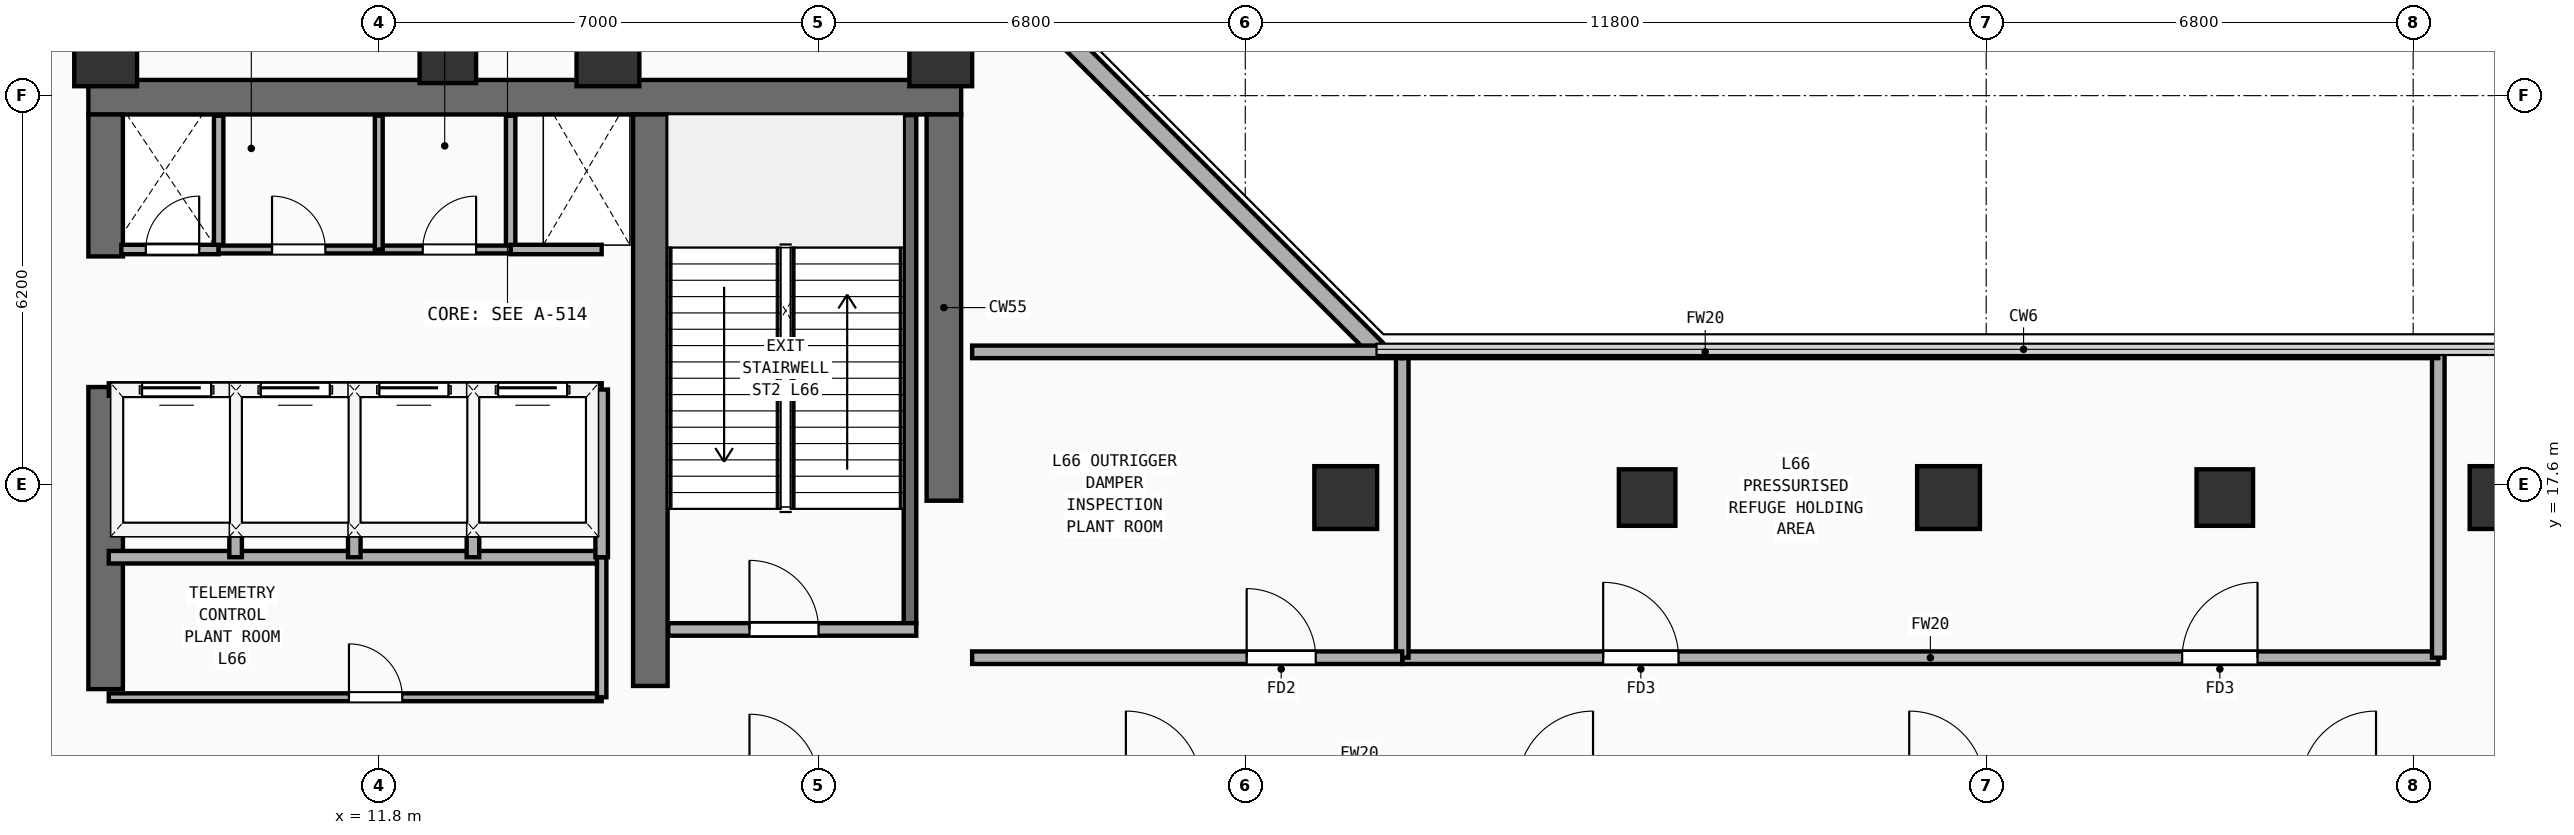
"""IFC4 building model, lengths in metres.
Left out: names, types, materials, properties, quantities, classifications, styles, units other than length and angle.
Written with IfcOpenShell. Run it as: python <this file> out.ifc"""

import sys

from ifc_helpers import new_model, si_unit, direction, frame, frame_2d, origin, origin_2d, place, context, subcontext, project, spatial, rectangle, extrude, element, fill, save


model = new_model("IFC4")
c1 = context("Model", 3, precision=1e-05, world=origin(), true_north=direction((0.0, 1.0)))
c2 = subcontext(c1, "Body", "Model", "MODEL_VIEW")
j1 = project(units=[si_unit("LENGTHUNIT", "METRE"), si_unit("PLANEANGLEUNIT", "RADIAN")], contexts=[c1])
p1 = place(None, origin())
s1 = spatial("IfcSite", under=j1, at=p1, CompositionType="ELEMENT")
p2 = place(p1, origin())
s2 = spatial("IfcBuilding", under=s1, at=p2, CompositionType="ELEMENT")
p3 = place(p2, frame((0.0, 0.0, 257.7)))
s3 = spatial("IfcBuildingStorey", under=s2, at=p3, CompositionType="ELEMENT", Elevation=257.7)
p4 = place(p3, frame((7.175, 23.775, 0.0), z_axis=(0.0, 0.0, 1.0), x_axis=(1.0, 0.0, 0.0)))
e1 = element("IfcWall", 1, at=p4, inside=s3, PredefinedType="SHEAR", context=c2, shape_type="SweptSolid", body=[
    extrude(rectangle(XDim=13.9, YDim=0.55, at=frame_2d((6.95, 0.0))), origin(), (0.0, 0.0, 1.0), 4.86),
])
p5 = place(p3, frame((7.45, 14.35, 0.0), z_axis=(0.0, 0.0, 1.0), x_axis=(0.0, 1.0, 0.0)))
e2 = element("IfcWall", 2, at=p5, inside=s3, PredefinedType="SHEAR", context=c2, shape_type="SweptSolid", body=[
    extrude(rectangle(XDim=4.81, YDim=0.55, at=frame_2d((2.405, 0.0))), origin(), (0.0, 0.0, 1.0), 4.86),
])
p6 = place(p3, frame((7.45, 21.24, 0.0), z_axis=(0.0, 0.0, 1.0), x_axis=(0.0, 1.0, 0.0)))
e3 = element("IfcWall", 3, at=p6, inside=s3, PredefinedType="SHEAR", context=c2, shape_type="SweptSolid", body=[
    extrude(rectangle(XDim=2.26, YDim=0.55, at=frame_2d((1.13, 0.0))), origin(), (0.0, 0.0, 1.0), 4.86),
])
p7 = place(p3, frame((20.8, 17.35, 0.0), z_axis=(0.0, 0.0, 1.0), x_axis=(0.0, 1.0, 0.0)))
e4 = element("IfcWall", 4, at=p7, inside=s3, PredefinedType="SHEAR", context=c2, shape_type="SweptSolid", body=[
    extrude(rectangle(XDim=6.15, YDim=0.55, at=frame_2d((3.075, 0.0))), origin(), (0.0, 0.0, 1.0), 4.86),
])
p8 = place(p3, frame((16.125, 14.4, 0.0), z_axis=(0.0, 0.0, 1.0), x_axis=(0.0, 1.0, 0.0)))
e5 = element("IfcWall", 5, at=p8, inside=s3, PredefinedType="SHEAR", context=c2, shape_type="SweptSolid", body=[
    extrude(rectangle(XDim=9.1, YDim=0.55, at=frame_2d((4.55, 0.0))), origin(), (0.0, 0.0, 1.0), 4.86),
])
for number, where, z_axis, x_axis in (
    (6, (7.45, 24.45, 0.0), (0.0, 0.0, 1.0), (1.0, 0.0, 0.0)),
    (7, (15.45, 24.45, 0.0), (0.0, 0.0, 1.0), (1.0, 0.0, 0.0)),
    (8, (20.75, 24.45, 0.0), (0.0, 0.0, 1.0), (1.0, 0.0, 0.0)),
    (9, (27.2, 17.4, 0.0), (0.0, 0.0, 1.0), (1.0, 0.0, 0.0)),
    (10, (36.8, 17.4, 0.0), (0.0, 0.0, 1.0), (1.0, 0.0, 0.0)),
    (11, (45.6, 17.4, 0.0), (0.0, 0.0, 1.0), (1.0, 0.0, 0.0)),
):
    element("IfcColumn", number, at=place(p3, frame(where, z_axis=z_axis, x_axis=x_axis)), inside=s3, PredefinedType="COLUMN", context=c2, shape_type="SweptSolid", body=[
        extrude(rectangle(XDim=1.0, YDim=1.0, at=origin_2d()), origin(), (0.0, 0.0, 1.0), 4.86),
    ])
for number, where, z_axis, x_axis in (
    (12, (12.9, 24.45, 0.0), (0.0, 0.0, 1.0), (1.0, 0.0, 0.0)),
    (13, (32.0, 17.4, 0.0), (0.0, 0.0, 1.0), (1.0, 0.0, 0.0)),
    (14, (41.2, 17.4, 0.0), (0.0, 0.0, 1.0), (1.0, 0.0, 0.0)),
):
    element("IfcColumn", number, at=place(p3, frame(where, z_axis=z_axis, x_axis=x_axis)), inside=s3, PredefinedType="COLUMN", context=c2, shape_type="SweptSolid", body=[
        extrude(rectangle(XDim=0.9, YDim=0.9, at=origin_2d()), origin(), (0.0, 0.0, 1.0), 4.86),
    ])
p9 = place(p3, frame((27.685, 19.775, 0.0), z_axis=(0.0, 0.0, 1.0), x_axis=(-0.707106781187, 0.707106781187, 0.0)))
e15 = element("IfcWall", 15, at=p9, inside=s3, PredefinedType="SOLIDWALL", context=c2, shape_type="SweptSolid", body=[
    extrude(rectangle(XDim=9.207, YDim=0.28, at=frame_2d((4.603, 0.0))), origin(), (0.0, 0.0, 1.0), 4.86),
])
p10 = place(p3, frame((20.26, 15.4, 0.0), z_axis=(0.0, 0.0, 1.0), x_axis=(0.0, 1.0, 0.0)))
e16 = element("IfcWall", 16, at=p10, inside=s3, PredefinedType="SHEAR", context=c2, shape_type="SweptSolid", body=[
    extrude(rectangle(XDim=8.09, YDim=0.2, at=frame_2d((4.045, 0.0))), origin(), (0.0, 0.0, 1.0), 4.86),
])
p11 = place(p3, frame((16.41, 15.3, 0.0), z_axis=(0.0, 0.0, 1.0), x_axis=(1.0, 0.0, 0.0)))
e17 = element("IfcWall", 17, at=p11, inside=s3, PredefinedType="PARTITIONING", context=c2, shape_type="SweptSolid", body=[
    extrude(rectangle(XDim=3.95, YDim=0.2, at=frame_2d((1.975, 0.0))), origin(), (0.0, 0.0, 1.0), 4.86),
])
p12 = place(p11, frame((1.294, 0.0, 0.0)))
e18 = element("IfcOpeningElement", 18, at=p12, cuts=e17, PredefinedType="OPENING", context=c2, shape_type="SweptSolid", body=[
    extrude(rectangle(XDim=1.1, YDim=2.2, at=frame_2d((0.55, 1.1))), frame((0.0, 0.11, 0.0), z_axis=(0.0, -1.0, 0.0), x_axis=(1.0, 0.0, 0.0)), (0.0, 0.0, 1.0), 0.22),
])
p13 = place(p3, frame((7.5, 16.45, 0.0), z_axis=(0.0, 0.0, 1.0), x_axis=(1.0, 0.0, 0.0)))
e19 = element("IfcWall", 19, at=p13, inside=s3, PredefinedType="PARTITIONING", context=c2, shape_type="SweptSolid", body=[
    extrude(rectangle(XDim=7.85, YDim=0.2, at=frame_2d((3.925, 0.0))), origin(), (0.0, 0.0, 1.0), 4.86),
])
p14 = place(p3, frame((7.5, 14.22, 0.0), z_axis=(0.0, 0.0, 1.0), x_axis=(1.0, 0.0, 0.0)))
e20 = element("IfcWall", 20, at=p14, inside=s3, PredefinedType="PARTITIONING", context=c2, shape_type="SweptSolid", body=[
    extrude(rectangle(XDim=7.85, YDim=0.125, at=frame_2d((3.925, 0.0))), origin(), (0.0, 0.0, 1.0), 4.86),
])
p15 = place(p14, frame((3.825, 0.0, 0.0)))
e21 = element("IfcOpeningElement", 21, at=p15, cuts=e20, PredefinedType="OPENING", context=c2, shape_type="SweptSolid", body=[
    extrude(rectangle(XDim=0.85, YDim=2.15, at=frame_2d((0.425, 1.075))), frame((0.0, 0.073, 0.0), z_axis=(0.0, -1.0, 0.0), x_axis=(1.0, 0.0, 0.0)), (0.0, 0.0, 1.0), 0.145),
])
p16 = place(p3, frame((15.35, 14.22, 0.0), z_axis=(0.0, 0.0, 1.0), x_axis=(0.0, 1.0, 0.0)))
e22 = element("IfcWall", 22, at=p16, inside=s3, PredefinedType="PARTITIONING", context=c2, shape_type="SweptSolid", body=[
    extrude(rectangle(XDim=2.23, YDim=0.15, at=frame_2d((1.115, 0.0))), origin(), (0.0, 0.0, 1.0), 4.86),
])
p17 = place(p3, frame((7.5, 19.12, 0.0), z_axis=(0.0, 0.0, 1.0), x_axis=(1.0, 0.0, 0.0)))
e23 = element("IfcWall", 23, at=p17, inside=s3, PredefinedType="PARTITIONING", context=c2, shape_type="SweptSolid", body=[
    extrude(rectangle(XDim=7.85, YDim=0.2, at=frame_2d((3.925, 0.0))), origin(), (0.0, 0.0, 1.0), 4.86),
])
p18 = place(p17, frame((0.53, 0.0, 0.0)))
e24 = element("IfcOpeningElement", 24, at=p18, cuts=e23, PredefinedType="OPENING", context=c2, shape_type="SweptSolid", body=[
    extrude(rectangle(XDim=1.1, YDim=2.2, at=frame_2d((0.55, 1.1))), frame((0.0, 0.11, 0.0), z_axis=(0.0, -1.0, 0.0), x_axis=(1.0, 0.0, 0.0)), (0.0, 0.0, 1.0), 0.22),
])
p19 = place(p17, frame((2.42, 0.0, 0.0)))
e25 = element("IfcOpeningElement", 25, at=p19, cuts=e23, PredefinedType="OPENING", context=c2, shape_type="SweptSolid", body=[
    extrude(rectangle(XDim=1.1, YDim=2.2, at=frame_2d((0.55, 1.1))), frame((0.0, 0.11, 0.0), z_axis=(0.0, -1.0, 0.0), x_axis=(1.0, 0.0, 0.0)), (0.0, 0.0, 1.0), 0.22),
])
p20 = place(p17, frame((4.31, 0.0, 0.0)))
e26 = element("IfcOpeningElement", 26, at=p20, cuts=e23, PredefinedType="OPENING", context=c2, shape_type="SweptSolid", body=[
    extrude(rectangle(XDim=1.1, YDim=2.2, at=frame_2d((0.55, 1.1))), frame((0.0, 0.11, 0.0), z_axis=(0.0, -1.0, 0.0), x_axis=(1.0, 0.0, 0.0)), (0.0, 0.0, 1.0), 0.22),
])
p21 = place(p17, frame((6.2, 0.0, 0.0)))
e27 = element("IfcOpeningElement", 27, at=p21, cuts=e23, PredefinedType="OPENING", context=c2, shape_type="SweptSolid", body=[
    extrude(rectangle(XDim=1.1, YDim=2.2, at=frame_2d((0.55, 1.1))), frame((0.0, 0.11, 0.0), z_axis=(0.0, -1.0, 0.0), x_axis=(1.0, 0.0, 0.0)), (0.0, 0.0, 1.0), 0.22),
])
for number, where, z_axis, x_axis in (
    (28, (15.35, 16.45, 0.0), (0.0, 0.0, 1.0), (0.0, 1.0, 0.0)),
    (29, (9.52, 16.45, 0.0), (0.0, 0.0, 1.0), (0.0, 1.0, 0.0)),
    (30, (11.41, 16.45, 0.0), (0.0, 0.0, 1.0), (0.0, 1.0, 0.0)),
    (31, (13.3, 16.45, 0.0), (0.0, 0.0, 1.0), (0.0, 1.0, 0.0)),
):
    element("IfcWall", number, at=place(p3, frame(where, z_axis=z_axis, x_axis=x_axis)), inside=s3, PredefinedType="PARTITIONING", context=c2, shape_type="SweptSolid", body=[
        extrude(rectangle(XDim=2.67, YDim=0.2, at=frame_2d((1.335, 0.0))), origin(), (0.0, 0.0, 1.0), 4.86),
    ])
for number, where, z_axis, x_axis in (
    (32, (9.25, 21.35, 0.0), (0.0, 0.0, 1.0), (0.0, 1.0, 0.0)),
    (33, (13.9, 21.35, 0.0), (0.0, 0.0, 1.0), (0.0, 1.0, 0.0)),
):
    element("IfcWall", number, at=place(p3, frame(where, z_axis=z_axis, x_axis=x_axis)), inside=s3, PredefinedType="PARTITIONING", context=c2, shape_type="SweptSolid", body=[
        extrude(rectangle(XDim=2.13, YDim=0.15, at=frame_2d((1.065, 0.0))), origin(), (0.0, 0.0, 1.0), 4.86),
    ])
p22 = place(p3, frame((7.7, 21.35, 0.0), z_axis=(0.0, 0.0, 1.0), x_axis=(1.0, 0.0, 0.0)))
e34 = element("IfcWall", 34, at=p22, inside=s3, PredefinedType="PARTITIONING", context=c2, shape_type="SweptSolid", body=[
    extrude(rectangle(XDim=1.55, YDim=0.15, at=frame_2d((0.775, 0.0))), origin(), (0.0, 0.0, 1.0), 4.86),
])
p23 = place(p22, frame((0.39, 0.0, 0.0)))
e35 = element("IfcOpeningElement", 35, at=p23, cuts=e34, PredefinedType="OPENING", context=c2, shape_type="SweptSolid", body=[
    extrude(rectangle(XDim=0.85, YDim=2.15, at=frame_2d((0.425, 1.075))), frame((0.0, 0.085, 0.0), z_axis=(0.0, -1.0, 0.0), x_axis=(1.0, 0.0, 0.0)), (0.0, 0.0, 1.0), 0.17),
])
p24 = place(p3, frame((13.9, 21.35, 0.0), z_axis=(0.0, 0.0, 1.0), x_axis=(1.0, 0.0, 0.0)))
e36 = element("IfcWall", 36, at=p24, inside=s3, PredefinedType="PARTITIONING", context=c2, shape_type="SweptSolid", body=[
    extrude(rectangle(XDim=1.45, YDim=0.15, at=frame_2d((0.725, 0.0))), origin(), (0.0, 0.0, 1.0), 4.86),
])
p25 = place(p3, frame((9.25, 21.35, 0.0), z_axis=(0.0, 0.0, 1.0), x_axis=(1.0, 0.0, 0.0)))
e37 = element("IfcWall", 37, at=p25, inside=s3, PredefinedType="PARTITIONING", context=c2, shape_type="SweptSolid", body=[
    extrude(rectangle(XDim=4.65, YDim=0.125, at=frame_2d((2.325, 0.0))), origin(), (0.0, 0.0, 1.0), 4.86),
])
p26 = place(p25, frame((0.85, 0.0, 0.0)))
e38 = element("IfcOpeningElement", 38, at=p26, cuts=e37, PredefinedType="OPENING", context=c2, shape_type="SweptSolid", body=[
    extrude(rectangle(XDim=0.85, YDim=2.15, at=frame_2d((0.425, 1.075))), frame((0.0, 0.073, 0.0), z_axis=(0.0, -1.0, 0.0), x_axis=(1.0, 0.0, 0.0)), (0.0, 0.0, 1.0), 0.145),
])
p27 = place(p25, frame((3.25, 0.0, 0.0)))
e39 = element("IfcOpeningElement", 39, at=p27, cuts=e37, PredefinedType="OPENING", context=c2, shape_type="SweptSolid", body=[
    extrude(rectangle(XDim=0.85, YDim=2.15, at=frame_2d((0.425, 1.075))), frame((0.0, 0.073, 0.0), z_axis=(0.0, -1.0, 0.0), x_axis=(1.0, 0.0, 0.0)), (0.0, 0.0, 1.0), 0.145),
])
p28 = place(p3, frame((11.8, 21.35, 0.0), z_axis=(0.0, 0.0, 1.0), x_axis=(0.0, 1.0, 0.0)))
e40 = element("IfcWall", 40, at=p28, inside=s3, PredefinedType="PARTITIONING", context=c2, shape_type="SweptSolid", body=[
    extrude(rectangle(XDim=2.13, YDim=0.125, at=frame_2d((1.065, 0.0))), origin(), (0.0, 0.0, 1.0), 4.86),
])
p29 = place(p3, frame((28.1, 14.85, 0.0), z_axis=(0.0, 0.0, 1.0), x_axis=(1.0, 0.0, 0.0)))
e41 = element("IfcWall", 41, at=p29, inside=s3, PredefinedType="PARTITIONING", context=c2, shape_type="SweptSolid", body=[
    extrude(rectangle(XDim=16.5, YDim=0.2, at=frame_2d((8.25, 0.0))), origin(), (0.0, 0.0, 1.0), 4.86),
])
p30 = place(p29, frame((3.2, 0.0, 0.0)))
e42 = element("IfcOpeningElement", 42, at=p30, cuts=e41, PredefinedType="OPENING", context=c2, shape_type="SweptSolid", body=[
    extrude(rectangle(XDim=1.2, YDim=2.25, at=frame_2d((0.6, 1.125))), frame((0.0, 0.11, 0.0), z_axis=(0.0, -1.0, 0.0), x_axis=(1.0, 0.0, 0.0)), (0.0, 0.0, 1.0), 0.22),
])
p31 = place(p29, frame((12.421, 0.0, 0.0)))
e43 = element("IfcOpeningElement", 43, at=p31, cuts=e41, PredefinedType="OPENING", context=c2, shape_type="SweptSolid", body=[
    extrude(rectangle(XDim=1.2, YDim=2.25, at=frame_2d((0.6, 1.125))), frame((0.0, 0.11, 0.0), z_axis=(0.0, -1.0, 0.0), x_axis=(1.0, 0.0, 0.0)), (0.0, 0.0, 1.0), 0.22),
])
for number, where, z_axis, x_axis in (
    (44, (28.1, 14.85, 0.0), (0.0, 0.0, 1.0), (0.0, 1.0, 0.0)),
    (45, (44.6, 14.85, 0.0), (0.0, 0.0, 1.0), (0.0, 1.0, 0.0)),
):
    element("IfcWall", number, at=place(p3, frame(where, z_axis=z_axis, x_axis=x_axis)), inside=s3, PredefinedType="PARTITIONING", context=c2, shape_type="SweptSolid", body=[
        extrude(rectangle(XDim=4.87, YDim=0.2, at=frame_2d((2.435, 0.0))), origin(), (0.0, 0.0, 1.0), 4.86),
    ])
p32 = place(p3, frame((28.1, 19.72, 0.0), z_axis=(0.0, 0.0, 1.0), x_axis=(1.0, 0.0, 0.0)))
e46 = element("IfcWall", 46, at=p32, inside=s3, PredefinedType="PARTITIONING", context=c2, shape_type="SweptSolid", body=[
    extrude(rectangle(XDim=16.5, YDim=0.2, at=frame_2d((8.25, 0.0))), origin(), (0.0, 0.0, 1.0), 4.86),
])
p33 = place(p3, frame((21.25, 14.85, 0.0), z_axis=(0.0, 0.0, 1.0), x_axis=(1.0, 0.0, 0.0)))
e47 = element("IfcWall", 47, at=p33, inside=s3, PredefinedType="PARTITIONING", context=c2, shape_type="SweptSolid", body=[
    extrude(rectangle(XDim=6.85, YDim=0.2, at=frame_2d((3.425, 0.0))), origin(), (0.0, 0.0, 1.0), 4.86),
])
p34 = place(p33, frame((4.372, 0.0, 0.0)))
e48 = element("IfcOpeningElement", 48, at=p34, cuts=e47, PredefinedType="OPENING", context=c2, shape_type="SweptSolid", body=[
    extrude(rectangle(XDim=1.1, YDim=2.2, at=frame_2d((0.55, 1.1))), frame((0.0, 0.11, 0.0), z_axis=(0.0, -1.0, 0.0), x_axis=(1.0, 0.0, 0.0)), (0.0, 0.0, 1.0), 0.22),
])
p35 = place(p3, frame((21.25, 19.72, 0.0), z_axis=(0.0, 0.0, 1.0), x_axis=(1.0, 0.0, 0.0)))
e49 = element("IfcWall", 49, at=p35, inside=s3, PredefinedType="PARTITIONING", context=c2, shape_type="SweptSolid", body=[
    extrude(rectangle(XDim=6.85, YDim=0.2, at=frame_2d((3.425, 0.0))), origin(), (0.0, 0.0, 1.0), 4.86),
])
p36 = place(p12, origin())
e50 = element("IfcDoor", 50, at=p36, inside=s3, OperationType="SINGLE_SWING_LEFT", PredefinedType="DOOR", context=c2, shape_type="SweptSolid", body=[
    extrude(rectangle(XDim=1.1, YDim=2.2, at=frame_2d((0.55, 1.1))), frame((0.0, 0.025, 0.0), z_axis=(0.0, -1.0, 0.0), x_axis=(1.0, 0.0, 0.0)), (0.0, 0.0, 1.0), 0.05),
])
fill(e18, e50)
p37 = place(p15, origin())
e51 = element("IfcDoor", 51, at=p37, inside=s3, OperationType="SINGLE_SWING_LEFT", PredefinedType="DOOR", context=c2, shape_type="SweptSolid", body=[
    extrude(rectangle(XDim=0.85, YDim=2.15, at=frame_2d((0.425, 1.075))), frame((0.0, 0.025, 0.0), z_axis=(0.0, -1.0, 0.0), x_axis=(1.0, 0.0, 0.0)), (0.0, 0.0, 1.0), 0.05),
])
fill(e21, e51)
p38 = place(p18, origin())
e52 = element("IfcDoor", 52, at=p38, inside=s3, OperationType="SLIDING_TO_LEFT", PredefinedType="DOOR", context=c2, shape_type="SweptSolid", body=[
    extrude(rectangle(XDim=1.1, YDim=2.2, at=frame_2d((0.55, 1.1))), frame((0.0, 0.025, 0.0), z_axis=(0.0, -1.0, 0.0), x_axis=(1.0, 0.0, 0.0)), (0.0, 0.0, 1.0), 0.05),
])
fill(e24, e52)
p39 = place(p19, origin())
e53 = element("IfcDoor", 53, at=p39, inside=s3, OperationType="SLIDING_TO_LEFT", PredefinedType="DOOR", context=c2, shape_type="SweptSolid", body=[
    extrude(rectangle(XDim=1.1, YDim=2.2, at=frame_2d((0.55, 1.1))), frame((0.0, 0.025, 0.0), z_axis=(0.0, -1.0, 0.0), x_axis=(1.0, 0.0, 0.0)), (0.0, 0.0, 1.0), 0.05),
])
fill(e25, e53)
p40 = place(p20, origin())
e54 = element("IfcDoor", 54, at=p40, inside=s3, OperationType="SLIDING_TO_LEFT", PredefinedType="DOOR", context=c2, shape_type="SweptSolid", body=[
    extrude(rectangle(XDim=1.1, YDim=2.2, at=frame_2d((0.55, 1.1))), frame((0.0, 0.025, 0.0), z_axis=(0.0, -1.0, 0.0), x_axis=(1.0, 0.0, 0.0)), (0.0, 0.0, 1.0), 0.05),
])
fill(e26, e54)
p41 = place(p21, origin())
e55 = element("IfcDoor", 55, at=p41, inside=s3, OperationType="SLIDING_TO_LEFT", PredefinedType="DOOR", context=c2, shape_type="SweptSolid", body=[
    extrude(rectangle(XDim=1.1, YDim=2.2, at=frame_2d((0.55, 1.1))), frame((0.0, 0.025, 0.0), z_axis=(0.0, -1.0, 0.0), x_axis=(1.0, 0.0, 0.0)), (0.0, 0.0, 1.0), 0.05),
])
fill(e27, e55)
p42 = place(p23, origin())
e56 = element("IfcDoor", 56, at=p42, inside=s3, OperationType="SINGLE_SWING_RIGHT", PredefinedType="DOOR", context=c2, shape_type="SweptSolid", body=[
    extrude(rectangle(XDim=0.85, YDim=2.15, at=frame_2d((0.425, 1.075))), frame((0.0, 0.025, 0.0), z_axis=(0.0, -1.0, 0.0), x_axis=(1.0, 0.0, 0.0)), (0.0, 0.0, 1.0), 0.05),
])
fill(e35, e56)
p43 = place(p26, origin())
e57 = element("IfcDoor", 57, at=p43, inside=s3, OperationType="SINGLE_SWING_LEFT", PredefinedType="DOOR", context=c2, shape_type="SweptSolid", body=[
    extrude(rectangle(XDim=0.85, YDim=2.15, at=frame_2d((0.425, 1.075))), frame((0.0, 0.025, 0.0), z_axis=(0.0, -1.0, 0.0), x_axis=(1.0, 0.0, 0.0)), (0.0, 0.0, 1.0), 0.05),
])
fill(e38, e57)
p44 = place(p27, origin())
e58 = element("IfcDoor", 58, at=p44, inside=s3, OperationType="SINGLE_SWING_RIGHT", PredefinedType="DOOR", context=c2, shape_type="SweptSolid", body=[
    extrude(rectangle(XDim=0.85, YDim=2.15, at=frame_2d((0.425, 1.075))), frame((0.0, 0.025, 0.0), z_axis=(0.0, -1.0, 0.0), x_axis=(1.0, 0.0, 0.0)), (0.0, 0.0, 1.0), 0.05),
])
fill(e39, e58)
p45 = place(p30, origin())
e59 = element("IfcDoor", 59, at=p45, inside=s3, OperationType="SINGLE_SWING_LEFT", PredefinedType="DOOR", context=c2, shape_type="SweptSolid", body=[
    extrude(rectangle(XDim=1.2, YDim=2.25, at=frame_2d((0.6, 1.125))), frame((0.0, 0.025, 0.0), z_axis=(0.0, -1.0, 0.0), x_axis=(1.0, 0.0, 0.0)), (0.0, 0.0, 1.0), 0.05),
])
fill(e42, e59)
p46 = place(p31, origin())
e60 = element("IfcDoor", 60, at=p46, inside=s3, OperationType="SINGLE_SWING_RIGHT", PredefinedType="DOOR", context=c2, shape_type="SweptSolid", body=[
    extrude(rectangle(XDim=1.2, YDim=2.25, at=frame_2d((0.6, 1.125))), frame((0.0, 0.025, 0.0), z_axis=(0.0, -1.0, 0.0), x_axis=(1.0, 0.0, 0.0)), (0.0, 0.0, 1.0), 0.05),
])
fill(e43, e60)
p47 = place(p34, origin())
e61 = element("IfcDoor", 61, at=p47, inside=s3, OperationType="SINGLE_SWING_LEFT", PredefinedType="DOOR", context=c2, shape_type="SweptSolid", body=[
    extrude(rectangle(XDim=1.1, YDim=2.2, at=frame_2d((0.55, 1.1))), frame((0.0, 0.025, 0.0), z_axis=(0.0, -1.0, 0.0), x_axis=(1.0, 0.0, 0.0)), (0.0, 0.0, 1.0), 0.05),
])
fill(e48, e61)
save(model, sys.argv[1])
